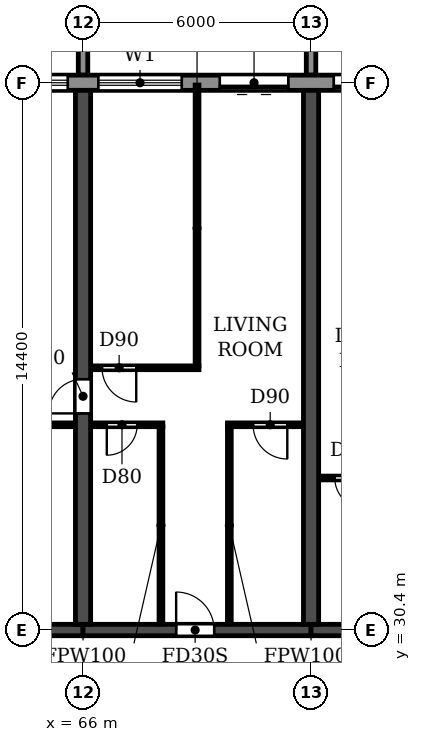
"""IFC4 building model, lengths in metres.
Left out: names, types, materials, properties, quantities, classifications, styles, units other than length and angle.
Written with IfcOpenShell. Run it as: python <this file> out.ifc"""

import sys

from ifc_helpers import new_model, si_unit, direction, frame, frame_2d, origin, place, context, subcontext, project, spatial, polyline, rectangle, outline, extrude, source, transform, mapped, element, fill, save


model = new_model("IFC4")
c1 = context("Model", 3, precision=1e-05, world=origin(), true_north=direction((0.0, 1.0)))
c2 = subcontext(c1, "Body", "Model", "MODEL_VIEW")
j1 = project(units=[si_unit("LENGTHUNIT", "METRE"), si_unit("PLANEANGLEUNIT", "RADIAN")], contexts=[c1])
p1 = place(None, origin())
s1 = spatial("IfcSite", under=j1, at=p1, CompositionType="ELEMENT")
p2 = place(p1, origin())
s2 = spatial("IfcBuilding", under=s1, at=p2, CompositionType="ELEMENT")
p3 = place(p2, frame((0.0, 0.0, 43.2)))
s3 = spatial("IfcBuildingStorey", under=s2, at=p3, CompositionType="ELEMENT", Elevation=43.2)
p4 = place(p3, frame((66.0, 30.55, 0.0), z_axis=(0.0, 0.0, 1.0), x_axis=(0.0, 1.0, 0.0)))
e1 = element("IfcWall", 1, at=p4, inside=s3, PredefinedType="SHEAR", context=c2, shape_type="SweptSolid", body=[
    extrude(rectangle(XDim=14.05, YDim=0.4, at=frame_2d((7.025, 0.0))), origin(), (0.0, 0.0, 1.0), 3.05),
])
p5 = place(p4, frame((5.55, 0.0, 0.0)))
e2 = element("IfcOpeningElement", 2, at=p5, cuts=e1, PredefinedType="OPENING", context=c2, shape_type="SweptSolid", body=[
    extrude(rectangle(XDim=0.9, YDim=2.1, at=frame_2d((0.45, 1.05))), frame((0.0, 0.21, 0.0), z_axis=(0.0, -1.0, 0.0), x_axis=(1.0, 0.0, 0.0)), (0.0, 0.0, 1.0), 0.42),
])
p6 = place(p3, frame((72.0, 30.55, 0.0), z_axis=(0.0, 0.0, 1.0), x_axis=(0.0, 1.0, 0.0)))
e3 = element("IfcWall", 3, at=p6, inside=s3, PredefinedType="SHEAR", context=c2, shape_type="SweptSolid", body=[
    extrude(rectangle(XDim=14.05, YDim=0.4, at=frame_2d((7.025, 0.0))), origin(), (0.0, 0.0, 1.0), 3.05),
])
p7 = place(p3, frame((60.0, 30.4, 0.0), z_axis=(0.0, 0.0, 1.0), x_axis=(1.0, 0.0, 0.0)))
e4 = element("IfcWall", 4, at=p7, inside=s3, PredefinedType="SHEAR", context=c2, shape_type="SweptSolid", body=[
    extrude(rectangle(XDim=6.0, YDim=0.3, at=frame_2d((3.0, 0.0))), origin(), (0.0, 0.0, 1.0), 2.45),
])
p8 = place(p3, frame((66.0, 30.4, 0.0), z_axis=(0.0, 0.0, 1.0), x_axis=(1.0, 0.0, 0.0)))
e5 = element("IfcWall", 5, at=p8, inside=s3, PredefinedType="SHEAR", context=c2, shape_type="SweptSolid", body=[
    extrude(rectangle(XDim=6.0, YDim=0.3, at=frame_2d((3.0, 0.0))), origin(), (0.0, 0.0, 1.0), 2.45),
])
p9 = place(p8, frame((2.45, 0.0, 0.0)))
e6 = element("IfcOpeningElement", 6, at=p9, cuts=e5, PredefinedType="OPENING", context=c2, shape_type="SweptSolid", body=[
    extrude(rectangle(XDim=1.0, YDim=2.1, at=frame_2d((0.5, 1.05))), frame((0.0, 0.16, 0.0), z_axis=(0.0, -1.0, 0.0), x_axis=(1.0, 0.0, 0.0)), (0.0, 0.0, 1.0), 0.32),
])
p10 = place(p3, frame((72.0, 30.4, 0.0), z_axis=(0.0, 0.0, 1.0), x_axis=(1.0, 0.0, 0.0)))
e7 = element("IfcWall", 7, at=p10, inside=s3, PredefinedType="SHEAR", context=c2, shape_type="SweptSolid", body=[
    extrude(rectangle(XDim=6.0, YDim=0.3, at=frame_2d((3.0, 0.0))), origin(), (0.0, 0.0, 1.0), 2.45),
])
p11 = place(p10, frame((2.45, 0.0, 0.0)))
e8 = element("IfcOpeningElement", 8, at=p11, cuts=e7, PredefinedType="OPENING", context=c2, shape_type="SweptSolid", body=[
    extrude(rectangle(XDim=1.0, YDim=2.1, at=frame_2d((0.5, 1.05))), frame((0.0, 0.16, 0.0), z_axis=(0.0, -1.0, 0.0), x_axis=(1.0, 0.0, 0.0)), (0.0, 0.0, 1.0), 0.32),
])
p12 = place(p3, frame((97.317, 44.8, 0.0), z_axis=(0.0, 0.0, 1.0), x_axis=(-1.0, 0.0, 0.0)))
e9 = element("IfcWall", 9, at=p12, inside=s3, PredefinedType="STANDARD", context=c2, shape_type="SweptSolid", body=[
    extrude(rectangle(XDim=92.634, YDim=0.4, at=frame_2d((46.317, 0.0))), origin(), (0.0, 0.0, 1.0), 3.05),
])
p13 = place(p12, frame((88.917, 0.0, 0.0)))
e10 = element("IfcOpeningElement", 10, at=p13, cuts=e9, PredefinedType="OPENING", context=c2, shape_type="SweptSolid", body=[
    extrude(rectangle(XDim=1.8, YDim=2.4, at=frame_2d((0.9, 1.2))), frame((0.0, 0.21, 0.0), z_axis=(0.0, -1.0, 0.0), x_axis=(1.0, 0.0, 0.0)), (0.0, 0.0, 1.0), 0.42),
])
p14 = place(p12, frame((85.717, 0.0, 0.9)))
e11 = element("IfcOpeningElement", 11, at=p14, cuts=e9, PredefinedType="OPENING", context=c2, shape_type="SweptSolid", body=[
    extrude(rectangle(XDim=2.2, YDim=1.5, at=frame_2d((1.1, 0.75))), frame((0.0, 0.21, 0.0), z_axis=(0.0, -1.0, 0.0), x_axis=(1.0, 0.0, 0.0)), (0.0, 0.0, 1.0), 0.42),
])
p15 = place(p12, frame((82.717, 0.0, 0.9)))
e12 = element("IfcOpeningElement", 12, at=p15, cuts=e9, PredefinedType="OPENING", context=c2, shape_type="SweptSolid", body=[
    extrude(rectangle(XDim=2.2, YDim=1.5, at=frame_2d((1.1, 0.75))), frame((0.0, 0.21, 0.0), z_axis=(0.0, -1.0, 0.0), x_axis=(1.0, 0.0, 0.0)), (0.0, 0.0, 1.0), 0.42),
])
p16 = place(p12, frame((79.717, 0.0, 0.9)))
e13 = element("IfcOpeningElement", 13, at=p16, cuts=e9, PredefinedType="OPENING", context=c2, shape_type="SweptSolid", body=[
    extrude(rectangle(XDim=2.2, YDim=1.5, at=frame_2d((1.1, 0.75))), frame((0.0, 0.21, 0.0), z_axis=(0.0, -1.0, 0.0), x_axis=(1.0, 0.0, 0.0)), (0.0, 0.0, 1.0), 0.42),
])
p17 = place(p12, frame((76.717, 0.0, 0.9)))
e14 = element("IfcOpeningElement", 14, at=p17, cuts=e9, PredefinedType="OPENING", context=c2, shape_type="SweptSolid", body=[
    extrude(rectangle(XDim=2.2, YDim=1.5, at=frame_2d((1.1, 0.75))), frame((0.0, 0.21, 0.0), z_axis=(0.0, -1.0, 0.0), x_axis=(1.0, 0.0, 0.0)), (0.0, 0.0, 1.0), 0.42),
])
p18 = place(p12, frame((73.917, 0.0, 0.0)))
e15 = element("IfcOpeningElement", 15, at=p18, cuts=e9, PredefinedType="OPENING", context=c2, shape_type="SweptSolid", body=[
    extrude(rectangle(XDim=1.8, YDim=2.4, at=frame_2d((0.9, 1.2))), frame((0.0, 0.21, 0.0), z_axis=(0.0, -1.0, 0.0), x_axis=(1.0, 0.0, 0.0)), (0.0, 0.0, 1.0), 0.42),
])
p19 = place(p12, frame((70.717, 0.0, 0.9)))
e16 = element("IfcOpeningElement", 16, at=p19, cuts=e9, PredefinedType="OPENING", context=c2, shape_type="SweptSolid", body=[
    extrude(rectangle(XDim=2.2, YDim=1.5, at=frame_2d((1.1, 0.75))), frame((0.0, 0.21, 0.0), z_axis=(0.0, -1.0, 0.0), x_axis=(1.0, 0.0, 0.0)), (0.0, 0.0, 1.0), 0.42),
])
p20 = place(p12, frame((67.717, 0.0, 0.9)))
e17 = element("IfcOpeningElement", 17, at=p20, cuts=e9, PredefinedType="OPENING", context=c2, shape_type="SweptSolid", body=[
    extrude(rectangle(XDim=2.2, YDim=1.5, at=frame_2d((1.1, 0.75))), frame((0.0, 0.21, 0.0), z_axis=(0.0, -1.0, 0.0), x_axis=(1.0, 0.0, 0.0)), (0.0, 0.0, 1.0), 0.42),
])
p21 = place(p12, frame((64.717, 0.0, 0.9)))
e18 = element("IfcOpeningElement", 18, at=p21, cuts=e9, PredefinedType="OPENING", context=c2, shape_type="SweptSolid", body=[
    extrude(rectangle(XDim=2.2, YDim=1.5, at=frame_2d((1.1, 0.75))), frame((0.0, 0.21, 0.0), z_axis=(0.0, -1.0, 0.0), x_axis=(1.0, 0.0, 0.0)), (0.0, 0.0, 1.0), 0.42),
])
p22 = place(p12, frame((61.917, 0.0, 0.0)))
e19 = element("IfcOpeningElement", 19, at=p22, cuts=e9, PredefinedType="OPENING", context=c2, shape_type="SweptSolid", body=[
    extrude(rectangle(XDim=1.8, YDim=2.4, at=frame_2d((0.9, 1.2))), frame((0.0, 0.21, 0.0), z_axis=(0.0, -1.0, 0.0), x_axis=(1.0, 0.0, 0.0)), (0.0, 0.0, 1.0), 0.42),
])
p23 = place(p12, frame((58.717, 0.0, 0.9)))
e20 = element("IfcOpeningElement", 20, at=p23, cuts=e9, PredefinedType="OPENING", context=c2, shape_type="SweptSolid", body=[
    extrude(rectangle(XDim=2.2, YDim=1.5, at=frame_2d((1.1, 0.75))), frame((0.0, 0.21, 0.0), z_axis=(0.0, -1.0, 0.0), x_axis=(1.0, 0.0, 0.0)), (0.0, 0.0, 1.0), 0.42),
])
p24 = place(p12, frame((55.717, 0.0, 0.9)))
e21 = element("IfcOpeningElement", 21, at=p24, cuts=e9, PredefinedType="OPENING", context=c2, shape_type="SweptSolid", body=[
    extrude(rectangle(XDim=2.2, YDim=1.5, at=frame_2d((1.1, 0.75))), frame((0.0, 0.21, 0.0), z_axis=(0.0, -1.0, 0.0), x_axis=(1.0, 0.0, 0.0)), (0.0, 0.0, 1.0), 0.42),
])
p25 = place(p12, frame((52.717, 0.0, 0.9)))
e22 = element("IfcOpeningElement", 22, at=p25, cuts=e9, PredefinedType="OPENING", context=c2, shape_type="SweptSolid", body=[
    extrude(rectangle(XDim=2.2, YDim=1.5, at=frame_2d((1.1, 0.75))), frame((0.0, 0.21, 0.0), z_axis=(0.0, -1.0, 0.0), x_axis=(1.0, 0.0, 0.0)), (0.0, 0.0, 1.0), 0.42),
])
p26 = place(p12, frame((49.917, 0.0, 0.0)))
e23 = element("IfcOpeningElement", 23, at=p26, cuts=e9, PredefinedType="OPENING", context=c2, shape_type="SweptSolid", body=[
    extrude(rectangle(XDim=1.8, YDim=2.4, at=frame_2d((0.9, 1.2))), frame((0.0, 0.21, 0.0), z_axis=(0.0, -1.0, 0.0), x_axis=(1.0, 0.0, 0.0)), (0.0, 0.0, 1.0), 0.42),
])
p27 = place(p12, frame((46.717, 0.0, 0.9)))
e24 = element("IfcOpeningElement", 24, at=p27, cuts=e9, PredefinedType="OPENING", context=c2, shape_type="SweptSolid", body=[
    extrude(rectangle(XDim=2.2, YDim=1.5, at=frame_2d((1.1, 0.75))), frame((0.0, 0.21, 0.0), z_axis=(0.0, -1.0, 0.0), x_axis=(1.0, 0.0, 0.0)), (0.0, 0.0, 1.0), 0.42),
])
p28 = place(p12, frame((43.717, 0.0, 0.9)))
e25 = element("IfcOpeningElement", 25, at=p28, cuts=e9, PredefinedType="OPENING", context=c2, shape_type="SweptSolid", body=[
    extrude(rectangle(XDim=2.2, YDim=1.5, at=frame_2d((1.1, 0.75))), frame((0.0, 0.21, 0.0), z_axis=(0.0, -1.0, 0.0), x_axis=(1.0, 0.0, 0.0)), (0.0, 0.0, 1.0), 0.42),
])
p29 = place(p12, frame((40.717, 0.0, 0.9)))
e26 = element("IfcOpeningElement", 26, at=p29, cuts=e9, PredefinedType="OPENING", context=c2, shape_type="SweptSolid", body=[
    extrude(rectangle(XDim=2.2, YDim=1.5, at=frame_2d((1.1, 0.75))), frame((0.0, 0.21, 0.0), z_axis=(0.0, -1.0, 0.0), x_axis=(1.0, 0.0, 0.0)), (0.0, 0.0, 1.0), 0.42),
])
p30 = place(p12, frame((37.917, 0.0, 0.0)))
e27 = element("IfcOpeningElement", 27, at=p30, cuts=e9, PredefinedType="OPENING", context=c2, shape_type="SweptSolid", body=[
    extrude(rectangle(XDim=1.8, YDim=2.4, at=frame_2d((0.9, 1.2))), frame((0.0, 0.21, 0.0), z_axis=(0.0, -1.0, 0.0), x_axis=(1.0, 0.0, 0.0)), (0.0, 0.0, 1.0), 0.42),
])
p31 = place(p12, frame((34.717, 0.0, 0.9)))
e28 = element("IfcOpeningElement", 28, at=p31, cuts=e9, PredefinedType="OPENING", context=c2, shape_type="SweptSolid", body=[
    extrude(rectangle(XDim=2.2, YDim=1.5, at=frame_2d((1.1, 0.75))), frame((0.0, 0.21, 0.0), z_axis=(0.0, -1.0, 0.0), x_axis=(1.0, 0.0, 0.0)), (0.0, 0.0, 1.0), 0.42),
])
p32 = place(p12, frame((31.717, 0.0, 0.9)))
e29 = element("IfcOpeningElement", 29, at=p32, cuts=e9, PredefinedType="OPENING", context=c2, shape_type="SweptSolid", body=[
    extrude(rectangle(XDim=2.2, YDim=1.5, at=frame_2d((1.1, 0.75))), frame((0.0, 0.21, 0.0), z_axis=(0.0, -1.0, 0.0), x_axis=(1.0, 0.0, 0.0)), (0.0, 0.0, 1.0), 0.42),
])
p33 = place(p12, frame((28.717, 0.0, 0.9)))
e30 = element("IfcOpeningElement", 30, at=p33, cuts=e9, PredefinedType="OPENING", context=c2, shape_type="SweptSolid", body=[
    extrude(rectangle(XDim=2.2, YDim=1.5, at=frame_2d((1.1, 0.75))), frame((0.0, 0.21, 0.0), z_axis=(0.0, -1.0, 0.0), x_axis=(1.0, 0.0, 0.0)), (0.0, 0.0, 1.0), 0.42),
])
p34 = place(p12, frame((25.917, 0.0, 0.0)))
e31 = element("IfcOpeningElement", 31, at=p34, cuts=e9, PredefinedType="OPENING", context=c2, shape_type="SweptSolid", body=[
    extrude(rectangle(XDim=1.8, YDim=2.4, at=frame_2d((0.9, 1.2))), frame((0.0, 0.21, 0.0), z_axis=(0.0, -1.0, 0.0), x_axis=(1.0, 0.0, 0.0)), (0.0, 0.0, 1.0), 0.42),
])
p35 = place(p12, frame((22.917, 0.0, 0.0)))
e32 = element("IfcOpeningElement", 32, at=p35, cuts=e9, PredefinedType="OPENING", context=c2, shape_type="SweptSolid", body=[
    extrude(rectangle(XDim=1.8, YDim=2.4, at=frame_2d((0.9, 1.2))), frame((0.0, 0.21, 0.0), z_axis=(0.0, -1.0, 0.0), x_axis=(1.0, 0.0, 0.0)), (0.0, 0.0, 1.0), 0.42),
])
p36 = place(p12, frame((19.717, 0.0, 0.9)))
e33 = element("IfcOpeningElement", 33, at=p36, cuts=e9, PredefinedType="OPENING", context=c2, shape_type="SweptSolid", body=[
    extrude(rectangle(XDim=2.2, YDim=1.5, at=frame_2d((1.1, 0.75))), frame((0.0, 0.21, 0.0), z_axis=(0.0, -1.0, 0.0), x_axis=(1.0, 0.0, 0.0)), (0.0, 0.0, 1.0), 0.42),
])
p37 = place(p12, frame((16.717, 0.0, 0.9)))
e34 = element("IfcOpeningElement", 34, at=p37, cuts=e9, PredefinedType="OPENING", context=c2, shape_type="SweptSolid", body=[
    extrude(rectangle(XDim=2.2, YDim=1.5, at=frame_2d((1.1, 0.75))), frame((0.0, 0.21, 0.0), z_axis=(0.0, -1.0, 0.0), x_axis=(1.0, 0.0, 0.0)), (0.0, 0.0, 1.0), 0.42),
])
p38 = place(p12, frame((13.717, 0.0, 0.9)))
e35 = element("IfcOpeningElement", 35, at=p38, cuts=e9, PredefinedType="OPENING", context=c2, shape_type="SweptSolid", body=[
    extrude(rectangle(XDim=2.2, YDim=1.5, at=frame_2d((1.1, 0.75))), frame((0.0, 0.21, 0.0), z_axis=(0.0, -1.0, 0.0), x_axis=(1.0, 0.0, 0.0)), (0.0, 0.0, 1.0), 0.42),
])
p39 = place(p12, frame((10.717, 0.0, 0.9)))
e36 = element("IfcOpeningElement", 36, at=p39, cuts=e9, PredefinedType="OPENING", context=c2, shape_type="SweptSolid", body=[
    extrude(rectangle(XDim=2.2, YDim=1.5, at=frame_2d((1.1, 0.75))), frame((0.0, 0.21, 0.0), z_axis=(0.0, -1.0, 0.0), x_axis=(1.0, 0.0, 0.0)), (0.0, 0.0, 1.0), 0.42),
])
p40 = place(p12, frame((7.917, 0.0, 0.0)))
e37 = element("IfcOpeningElement", 37, at=p40, cuts=e9, PredefinedType="OPENING", context=c2, shape_type="SweptSolid", body=[
    extrude(rectangle(XDim=1.8, YDim=2.4, at=frame_2d((0.9, 1.2))), frame((0.0, 0.21, 0.0), z_axis=(0.0, -1.0, 0.0), x_axis=(1.0, 0.0, 0.0)), (0.0, 0.0, 1.0), 0.42),
])
p41 = place(p12, frame((4.717, 0.0, 0.9)))
e38 = element("IfcOpeningElement", 38, at=p41, cuts=e9, PredefinedType="OPENING", context=c2, shape_type="SweptSolid", body=[
    extrude(rectangle(XDim=2.2, YDim=1.5, at=frame_2d((1.1, 0.75))), frame((0.0, 0.21, 0.0), z_axis=(0.0, -1.0, 0.0), x_axis=(1.0, 0.0, 0.0)), (0.0, 0.0, 1.0), 0.42),
])
p42 = place(p12, frame((1.917, 0.0, 0.0)))
e39 = element("IfcOpeningElement", 39, at=p42, cuts=e9, PredefinedType="OPENING", context=c2, shape_type="SweptSolid", body=[
    extrude(rectangle(XDim=1.8, YDim=2.4, at=frame_2d((0.9, 1.2))), frame((0.0, 0.21, 0.0), z_axis=(0.0, -1.0, 0.0), x_axis=(1.0, 0.0, 0.0)), (0.0, 0.0, 1.0), 0.42),
])
m1 = source(origin(), c2, "Body", "SweptSolid", [
    extrude(outline(polyline([(0.0, 0.0), (0.25, 0.0), (0.25, 3.1), (0.0, 3.1), (0.0, 0.0)])), origin(), (0.0, 0.0, 1.0), 3.1),
])
for number, where in (
    (40, (65.875, 45.0, 0.0)),
    (41, (71.875, 45.0, 0.0)),
):
    element("IfcWall", number, at=place(p3, frame(where)), inside=s3, PredefinedType="STANDARD", context=c2, shape_type="MappedRepresentation", body=[
        mapped(m1, transform((0.0, 0.0, 0.0))),
    ])
p43 = place(p3, frame((72.21, 34.4, 0.0), z_axis=(0.0, 0.0, 1.0), x_axis=(1.0, 0.0, 0.0)))
e42 = element("IfcWall", 42, at=p43, inside=s3, PredefinedType="PARTITIONING", context=c2, shape_type="SweptSolid", body=[
    extrude(rectangle(XDim=1.89, YDim=0.1, at=frame_2d((0.945, 0.0))), origin(), (0.0, 0.0, 1.0), 3.05),
])
p44 = place(p43, frame((0.415, 0.0, 0.0)))
e43 = element("IfcOpeningElement", 43, at=p44, cuts=e42, PredefinedType="OPENING", context=c2, shape_type="SweptSolid", body=[
    extrude(rectangle(XDim=0.8, YDim=2.1, at=frame_2d((0.4, 1.05))), frame((0.0, 0.06, 0.0), z_axis=(0.0, -1.0, 0.0), x_axis=(1.0, 0.0, 0.0)), (0.0, 0.0, 1.0), 0.12),
])
p45 = place(p3, frame((62.9, 35.8, 0.0), z_axis=(0.0, 0.0, 1.0), x_axis=(1.0, 0.0, 0.0)))
e44 = element("IfcWall", 44, at=p45, inside=s3, PredefinedType="PARTITIONING", context=c2, shape_type="SweptSolid", body=[
    extrude(rectangle(XDim=2.89, YDim=0.1, at=frame_2d((1.445, 0.0))), origin(), (0.0, 0.0, 1.0), 3.05),
])
p46 = place(p45, frame((1.2, 0.0, 0.0)))
e45 = element("IfcOpeningElement", 45, at=p46, cuts=e44, PredefinedType="OPENING", context=c2, shape_type="SweptSolid", body=[
    extrude(rectangle(XDim=0.8, YDim=2.1, at=frame_2d((0.4, 1.05))), frame((0.0, 0.06, 0.0), z_axis=(0.0, -1.0, 0.0), x_axis=(1.0, 0.0, 0.0)), (0.0, 0.0, 1.0), 0.12),
])
p47 = place(p3, frame((66.21, 35.8, 0.0), z_axis=(0.0, 0.0, 1.0), x_axis=(1.0, 0.0, 0.0)))
e46 = element("IfcWall", 46, at=p47, inside=s3, PredefinedType="PARTITIONING", context=c2, shape_type="SweptSolid", body=[
    extrude(rectangle(XDim=1.89, YDim=0.1, at=frame_2d((0.945, 0.0))), origin(), (0.0, 0.0, 1.0), 3.05),
])
p48 = place(p47, frame((0.415, 0.0, 0.0)))
e47 = element("IfcOpeningElement", 47, at=p48, cuts=e46, PredefinedType="OPENING", context=c2, shape_type="SweptSolid", body=[
    extrude(rectangle(XDim=0.8, YDim=2.1, at=frame_2d((0.4, 1.05))), frame((0.0, 0.06, 0.0), z_axis=(0.0, -1.0, 0.0), x_axis=(1.0, 0.0, 0.0)), (0.0, 0.0, 1.0), 0.12),
])
p49 = place(p3, frame((69.8, 35.8, 0.0), z_axis=(0.0, 0.0, 1.0), x_axis=(1.0, 0.0, 0.0)))
e48 = element("IfcWall", 48, at=p49, inside=s3, PredefinedType="PARTITIONING", context=c2, shape_type="SweptSolid", body=[
    extrude(rectangle(XDim=1.99, YDim=0.1, at=frame_2d((0.995, 0.0))), origin(), (0.0, 0.0, 1.0), 3.05),
])
p50 = place(p49, frame((0.675, 0.0, 0.0)))
e49 = element("IfcOpeningElement", 49, at=p50, cuts=e48, PredefinedType="OPENING", context=c2, shape_type="SweptSolid", body=[
    extrude(rectangle(XDim=0.9, YDim=2.1, at=frame_2d((0.45, 1.05))), frame((0.0, 0.06, 0.0), z_axis=(0.0, -1.0, 0.0), x_axis=(1.0, 0.0, 0.0)), (0.0, 0.0, 1.0), 0.12),
])
p51 = place(p3, frame((66.21, 37.3, 0.0), z_axis=(0.0, 0.0, 1.0), x_axis=(1.0, 0.0, 0.0)))
e50 = element("IfcWall", 50, at=p51, inside=s3, PredefinedType="PARTITIONING", context=c2, shape_type="SweptSolid", body=[
    extrude(rectangle(XDim=2.84, YDim=0.1, at=frame_2d((1.42, 0.0))), origin(), (0.0, 0.0, 1.0), 3.05),
])
p52 = place(p51, frame((0.29, 0.0, 0.0)))
e51 = element("IfcOpeningElement", 51, at=p52, cuts=e50, PredefinedType="OPENING", context=c2, shape_type="SweptSolid", body=[
    extrude(rectangle(XDim=0.9, YDim=2.1, at=frame_2d((0.45, 1.05))), frame((0.0, 0.06, 0.0), z_axis=(0.0, -1.0, 0.0), x_axis=(1.0, 0.0, 0.0)), (0.0, 0.0, 1.0), 0.12),
])
p53 = place(p3, frame((68.05, 30.56, 0.0), z_axis=(0.0, 0.0, 1.0), x_axis=(0.0, 1.0, 0.0)))
e52 = element("IfcWall", 52, at=p53, inside=s3, PredefinedType="PARTITIONING", context=c2, shape_type="SweptSolid", body=[
    extrude(rectangle(XDim=5.19, YDim=0.1, at=frame_2d((2.595, 0.0))), origin(), (0.0, 0.0, 1.0), 3.05),
])
p54 = place(p3, frame((69.0, 37.35, 0.0), z_axis=(0.0, 0.0, 1.0), x_axis=(0.0, 1.0, 0.0)))
e53 = element("IfcWall", 53, at=p54, inside=s3, PredefinedType="PARTITIONING", context=c2, shape_type="SweptSolid", body=[
    extrude(rectangle(XDim=7.39, YDim=0.1, at=frame_2d((3.695, 0.0))), origin(), (0.0, 0.0, 1.0), 3.05),
])
p55 = place(p3, frame((69.85, 30.56, 0.0), z_axis=(0.0, 0.0, 1.0), x_axis=(0.0, 1.0, 0.0)))
e54 = element("IfcWall", 54, at=p55, inside=s3, PredefinedType="PARTITIONING", context=c2, shape_type="SweptSolid", body=[
    extrude(rectangle(XDim=5.19, YDim=0.1, at=frame_2d((2.595, 0.0))), origin(), (0.0, 0.0, 1.0), 3.05),
])
p56 = place(p32, origin())
e55 = element("IfcWindow", 55, at=p56, inside=s3, PartitioningType="DOUBLE_PANEL_HORIZONTAL", PredefinedType="WINDOW", context=c2, shape_type="SweptSolid", body=[
    extrude(rectangle(XDim=2.2, YDim=1.5, at=frame_2d((1.1, 0.75))), frame((0.0, 0.03, 0.0), z_axis=(0.0, -1.0, 0.0), x_axis=(1.0, 0.0, 0.0)), (0.0, 0.0, 1.0), 0.06),
])
fill(e29, e55)
p57 = place(p33, origin())
e56 = element("IfcWindow", 56, at=p57, inside=s3, PartitioningType="DOUBLE_PANEL_HORIZONTAL", PredefinedType="WINDOW", context=c2, shape_type="SweptSolid", body=[
    extrude(rectangle(XDim=2.2, YDim=1.5, at=frame_2d((1.1, 0.75))), frame((0.0, 0.03, 0.0), z_axis=(0.0, -1.0, 0.0), x_axis=(1.0, 0.0, 0.0)), (0.0, 0.0, 1.0), 0.06),
])
fill(e30, e56)
p58 = place(p34, origin())
e57 = element("IfcDoor", 57, at=p58, inside=s3, OperationType="DOUBLE_DOOR_SLIDING", PredefinedType="DOOR", context=c2, shape_type="SweptSolid", body=[
    extrude(rectangle(XDim=1.8, YDim=2.4, at=frame_2d((0.9, 1.2))), frame((0.0, 0.025, 0.0), z_axis=(0.0, -1.0, 0.0), x_axis=(1.0, 0.0, 0.0)), (0.0, 0.0, 1.0), 0.05),
])
fill(e31, e57)
p59 = place(p35, origin())
e58 = element("IfcDoor", 58, at=p59, inside=s3, OperationType="DOUBLE_DOOR_SLIDING", PredefinedType="DOOR", context=c2, shape_type="SweptSolid", body=[
    extrude(rectangle(XDim=1.8, YDim=2.4, at=frame_2d((0.9, 1.2))), frame((0.0, 0.025, 0.0), z_axis=(0.0, -1.0, 0.0), x_axis=(1.0, 0.0, 0.0)), (0.0, 0.0, 1.0), 0.05),
])
fill(e32, e58)
p60 = place(p5, origin())
e59 = element("IfcDoor", 59, at=p60, inside=s3, OperationType="SINGLE_SWING_LEFT", PredefinedType="DOOR", context=c2, shape_type="SweptSolid", body=[
    extrude(rectangle(XDim=0.9, YDim=2.1, at=frame_2d((0.45, 1.05))), frame((0.0, 0.025, 0.0), z_axis=(0.0, -1.0, 0.0), x_axis=(1.0, 0.0, 0.0)), (0.0, 0.0, 1.0), 0.05),
])
fill(e2, e59)
p61 = place(p52, frame((0.9, 0.0, 0.0), z_axis=(0.0, 0.0, 1.0), x_axis=(-1.0, 0.0, 0.0)))
e60 = element("IfcDoor", 60, at=p61, inside=s3, OperationType="SINGLE_SWING_LEFT", PredefinedType="DOOR", context=c2, shape_type="SweptSolid", body=[
    extrude(rectangle(XDim=0.9, YDim=2.1, at=frame_2d((0.45, 1.05))), frame((0.0, 0.025, 0.0), z_axis=(0.0, -1.0, 0.0), x_axis=(1.0, 0.0, 0.0)), (0.0, 0.0, 1.0), 0.05),
])
fill(e51, e60)
p62 = place(p48, frame((0.8, 0.0, 0.0), z_axis=(0.0, 0.0, 1.0), x_axis=(-1.0, 0.0, 0.0)))
e61 = element("IfcDoor", 61, at=p62, inside=s3, OperationType="SINGLE_SWING_RIGHT", PredefinedType="DOOR", context=c2, shape_type="SweptSolid", body=[
    extrude(rectangle(XDim=0.8, YDim=2.1, at=frame_2d((0.4, 1.05))), frame((0.0, 0.025, 0.0), z_axis=(0.0, -1.0, 0.0), x_axis=(1.0, 0.0, 0.0)), (0.0, 0.0, 1.0), 0.05),
])
fill(e47, e61)
p63 = place(p9, origin())
e62 = element("IfcDoor", 62, at=p63, inside=s3, OperationType="SINGLE_SWING_LEFT", PredefinedType="DOOR", context=c2, shape_type="SweptSolid", body=[
    extrude(rectangle(XDim=1.0, YDim=2.1, at=frame_2d((0.5, 1.05))), frame((0.0, 0.025, 0.0), z_axis=(0.0, -1.0, 0.0), x_axis=(1.0, 0.0, 0.0)), (0.0, 0.0, 1.0), 0.05),
])
fill(e6, e62)
p64 = place(p50, frame((0.9, 0.0, 0.0), z_axis=(0.0, 0.0, 1.0), x_axis=(-1.0, 0.0, 0.0)))
e63 = element("IfcDoor", 63, at=p64, inside=s3, OperationType="SINGLE_SWING_LEFT", PredefinedType="DOOR", context=c2, shape_type="SweptSolid", body=[
    extrude(rectangle(XDim=0.9, YDim=2.1, at=frame_2d((0.45, 1.05))), frame((0.0, 0.025, 0.0), z_axis=(0.0, -1.0, 0.0), x_axis=(1.0, 0.0, 0.0)), (0.0, 0.0, 1.0), 0.05),
])
fill(e49, e63)
p65 = place(p44, frame((0.8, 0.0, 0.0), z_axis=(0.0, 0.0, 1.0), x_axis=(-1.0, 0.0, 0.0)))
e64 = element("IfcDoor", 64, at=p65, inside=s3, OperationType="SINGLE_SWING_LEFT", PredefinedType="DOOR", context=c2, shape_type="SweptSolid", body=[
    extrude(rectangle(XDim=0.8, YDim=2.1, at=frame_2d((0.4, 1.05))), frame((0.0, 0.025, 0.0), z_axis=(0.0, -1.0, 0.0), x_axis=(1.0, 0.0, 0.0)), (0.0, 0.0, 1.0), 0.05),
])
fill(e43, e64)
save(model, sys.argv[1])
